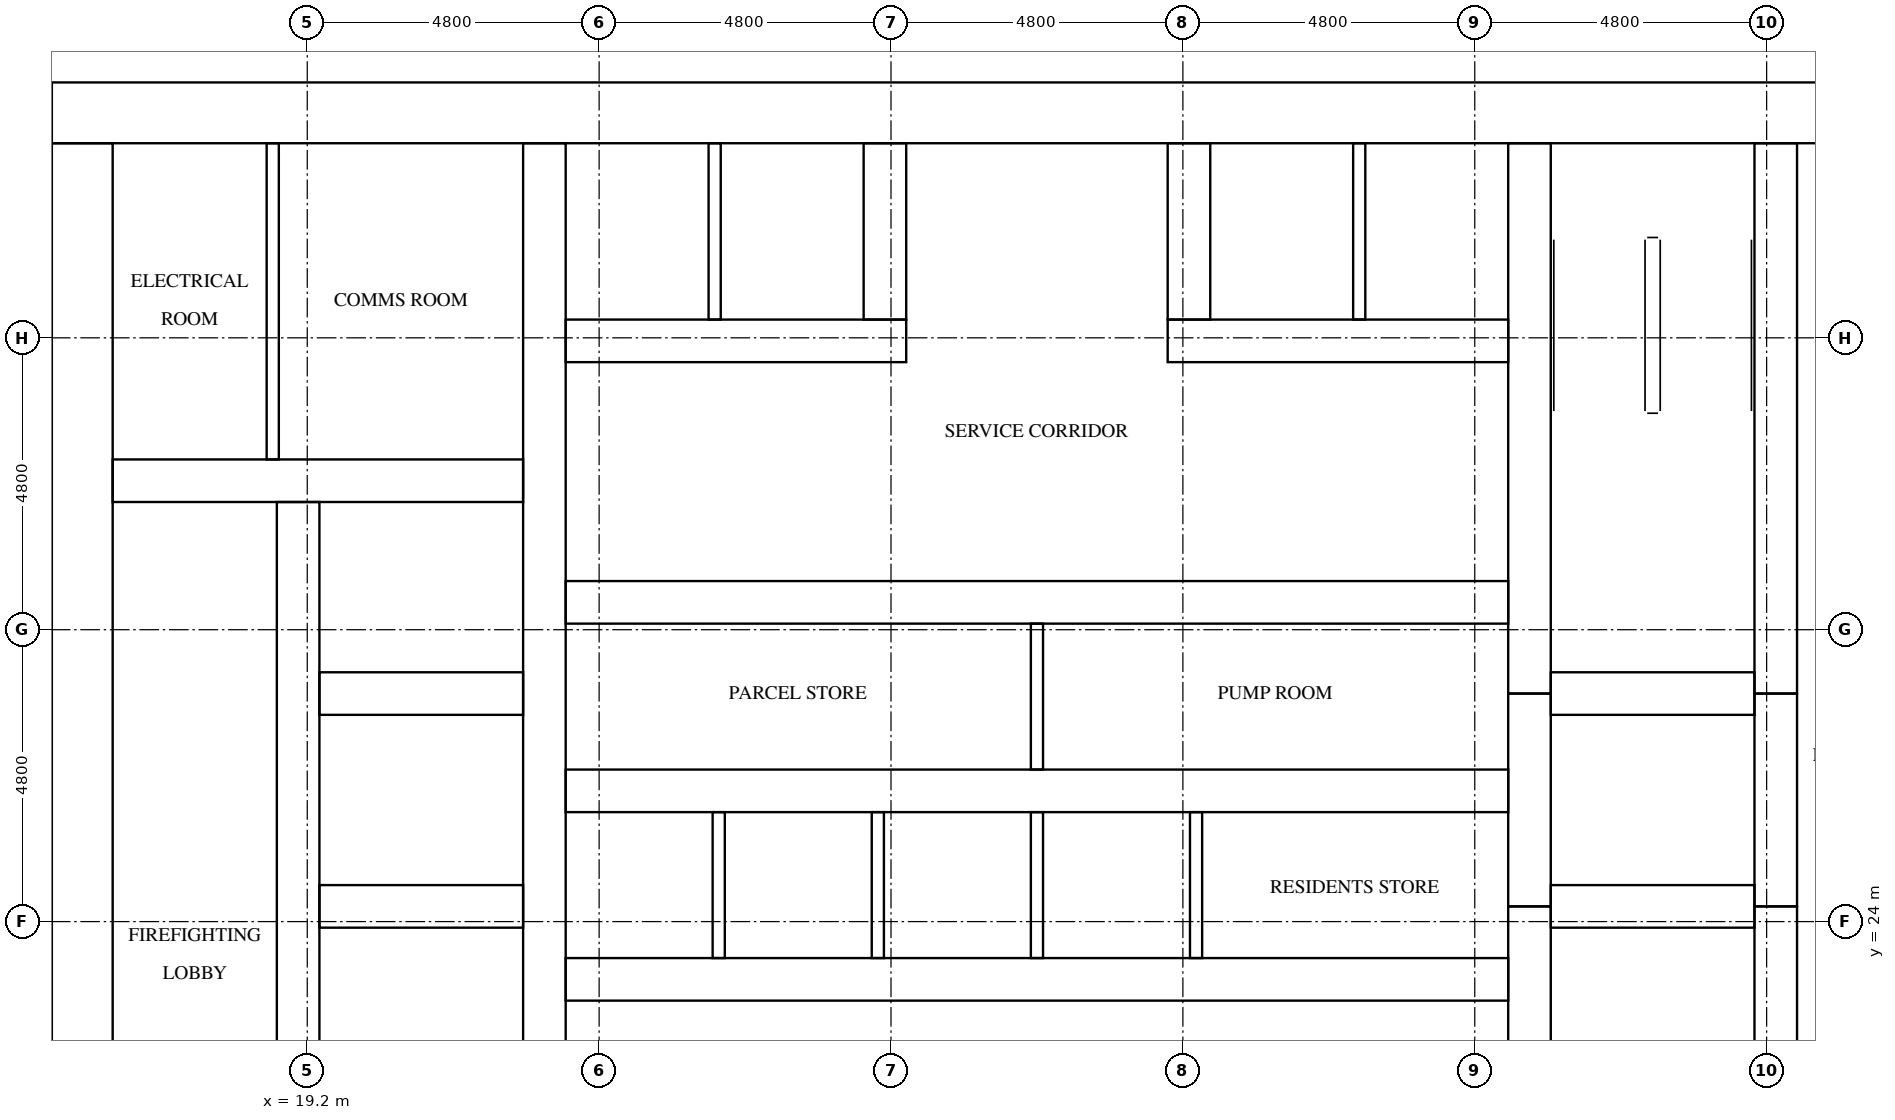
"""IFC4 building model, lengths in metres.
Left out: names, types, materials, properties, quantities, classifications, styles, units other than length and angle.
Written with IfcOpenShell. Run it as: python <this file> out.ifc"""

import sys

from ifc_helpers import new_model, si_unit, direction, frame, frame_2d, origin, place, context, subcontext, project, spatial, rectangle, extrude, element, fill, save


model = new_model("IFC4")
c1 = context("Model", 3, precision=1e-05, world=origin(), true_north=direction((0.0, 1.0)))
c2 = subcontext(c1, "Body", "Model", "MODEL_VIEW")
j1 = project(units=[si_unit("LENGTHUNIT", "METRE"), si_unit("PLANEANGLEUNIT", "RADIAN")], contexts=[c1])
p1 = place(None, origin())
s1 = spatial("IfcSite", under=j1, at=p1, CompositionType="ELEMENT")
p2 = place(p1, origin())
s2 = spatial("IfcBuilding", under=s1, at=p2, CompositionType="ELEMENT")
p3 = place(p2, frame((0.0, 0.0, 39.9)))
s3 = spatial("IfcBuildingStorey", under=s2, at=p3, CompositionType="ELEMENT", Elevation=39.9)
p4 = place(p3, frame((15.0, 37.3, 0.0), z_axis=(0.0, 0.0, 1.0), x_axis=(1.0, 0.0, 0.0)))
e1 = element("IfcWall", 1, at=p4, inside=s3, PredefinedType="SHEAR", context=c2, shape_type="SweptSolid", body=[
    extrude(rectangle(XDim=32.4, YDim=1.0, at=frame_2d((16.2, 0.0))), origin(), (0.0, 0.0, 1.0), 3.2),
])
p5 = place(p4, frame((15.3, 0.0, 0.0)))
e2 = element("IfcOpeningElement", 2, at=p5, cuts=e1, PredefinedType="OPENING", context=c2, shape_type="SweptSolid", body=[
    extrude(rectangle(XDim=1.8, YDim=2.1, at=frame_2d((0.9, 1.05))), frame((0.0, 0.51, 0.0), z_axis=(0.0, -1.0, 0.0), x_axis=(1.0, 0.0, 0.0)), (0.0, 0.0, 1.0), 1.02),
])
p6 = place(p4, frame((1.766, 0.0, 0.0)))
e3 = element("IfcOpeningElement", 3, at=p6, cuts=e1, PredefinedType="OPENING", context=c2, shape_type="SweptSolid", body=[
    extrude(rectangle(XDim=1.0, YDim=2.1, at=frame_2d((0.5, 1.05))), frame((0.0, 0.51, 0.0), z_axis=(0.0, -1.0, 0.0), x_axis=(1.0, 0.0, 0.0)), (0.0, 0.0, 1.0), 1.02),
])
p7 = place(p4, frame((5.241, 0.0, 0.0)))
e4 = element("IfcOpeningElement", 4, at=p7, cuts=e1, PredefinedType="OPENING", context=c2, shape_type="SweptSolid", body=[
    extrude(rectangle(XDim=1.0, YDim=2.1, at=frame_2d((0.5, 1.05))), frame((0.0, 0.51, 0.0), z_axis=(0.0, -1.0, 0.0), x_axis=(1.0, 0.0, 0.0)), (0.0, 0.0, 1.0), 1.02),
])
p8 = place(p3, frame((15.5, 16.0, 0.0), z_axis=(0.0, 0.0, 1.0), x_axis=(0.0, 1.0, 0.0)))
e5 = element("IfcWall", 5, at=p8, inside=s3, PredefinedType="SHEAR", context=c2, shape_type="SweptSolid", body=[
    extrude(rectangle(XDim=20.8, YDim=1.0, at=frame_2d((10.4, 0.0))), origin(), (0.0, 0.0, 1.0), 3.2),
])
p9 = place(p8, frame((4.76, 0.0, 0.0)))
e6 = element("IfcOpeningElement", 6, at=p9, cuts=e5, PredefinedType="OPENING", context=c2, shape_type="SweptSolid", body=[
    extrude(rectangle(XDim=1.2, YDim=2.1, at=frame_2d((0.6, 1.05))), frame((0.0, 0.51, 0.0), z_axis=(0.0, -1.0, 0.0), x_axis=(1.0, 0.0, 0.0)), (0.0, 0.0, 1.0), 1.02),
])
p10 = place(p3, frame((19.05, 16.0, 0.0), z_axis=(0.0, 0.0, 1.0), x_axis=(0.0, 1.0, 0.0)))
e7 = element("IfcWall", 7, at=p10, inside=s3, PredefinedType="SHEAR", context=c2, shape_type="SweptSolid", body=[
    extrude(rectangle(XDim=14.9, YDim=0.7, at=frame_2d((7.45, 0.0))), origin(), (0.0, 0.0, 1.0), 3.2),
])
p11 = place(p10, frame((9.45, 0.0, 0.0)))
e8 = element("IfcOpeningElement", 8, at=p11, cuts=e7, PredefinedType="OPENING", context=c2, shape_type="SweptSolid", body=[
    extrude(rectangle(XDim=1.1, YDim=2.1, at=frame_2d((0.55, 1.05))), frame((0.0, 0.36, 0.0), z_axis=(0.0, -1.0, 0.0), x_axis=(1.0, 0.0, 0.0)), (0.0, 0.0, 1.0), 0.72),
])
p12 = place(p10, frame((12.95, 0.0, 0.0)))
e9 = element("IfcOpeningElement", 9, at=p12, cuts=e7, PredefinedType="OPENING", context=c2, shape_type="SweptSolid", body=[
    extrude(rectangle(XDim=1.1, YDim=2.1, at=frame_2d((0.55, 1.05))), frame((0.0, 0.36, 0.0), z_axis=(0.0, -1.0, 0.0), x_axis=(1.0, 0.0, 0.0)), (0.0, 0.0, 1.0), 0.72),
])
p13 = place(p10, frame((0.2, 0.0, 0.0)))
e10 = element("IfcOpeningElement", 10, at=p13, cuts=e7, PredefinedType="OPENING", context=c2, shape_type="SweptSolid", body=[
    extrude(rectangle(XDim=1.2, YDim=2.1, at=frame_2d((0.6, 1.05))), frame((0.0, 0.36, 0.0), z_axis=(0.0, -1.0, 0.0), x_axis=(1.0, 0.0, 0.0)), (0.0, 0.0, 1.0), 0.72),
])
p14 = place(p3, frame((23.1, 16.0, 0.0), z_axis=(0.0, 0.0, 1.0), x_axis=(0.0, 1.0, 0.0)))
e11 = element("IfcWall", 11, at=p14, inside=s3, PredefinedType="SHEAR", context=c2, shape_type="SweptSolid", body=[
    extrude(rectangle(XDim=20.8, YDim=0.7, at=frame_2d((10.4, 0.0))), origin(), (0.0, 0.0, 1.0), 3.2),
])
p15 = place(p3, frame((39.3, 16.0, 0.0), z_axis=(0.0, 0.0, 1.0), x_axis=(0.0, 1.0, 0.0)))
e12 = element("IfcWall", 12, at=p15, inside=s3, PredefinedType="SHEAR", context=c2, shape_type="SweptSolid", body=[
    extrude(rectangle(XDim=8.25, YDim=0.7, at=frame_2d((4.125, 0.0))), origin(), (0.0, 0.0, 1.0), 3.2),
])
p16 = place(p3, frame((39.3, 24.25, 0.0), z_axis=(0.0, 0.0, 1.0), x_axis=(0.0, 1.0, 0.0)))
e13 = element("IfcWall", 13, at=p16, inside=s3, PredefinedType="SHEAR", context=c2, shape_type="SweptSolid", body=[
    extrude(rectangle(XDim=3.5, YDim=0.7, at=frame_2d((1.75, 0.0))), origin(), (0.0, 0.0, 1.0), 3.2),
])
p17 = place(p3, frame((39.3, 27.75, 0.0), z_axis=(0.0, 0.0, 1.0), x_axis=(0.0, 1.0, 0.0)))
e14 = element("IfcWall", 14, at=p17, inside=s3, PredefinedType="SHEAR", context=c2, shape_type="SweptSolid", body=[
    extrude(rectangle(XDim=9.05, YDim=0.7, at=frame_2d((4.525, 0.0))), origin(), (0.0, 0.0, 1.0), 3.2),
])
p18 = place(p3, frame((43.35, 16.0, 0.0), z_axis=(0.0, 0.0, 1.0), x_axis=(0.0, 1.0, 0.0)))
e15 = element("IfcWall", 15, at=p18, inside=s3, PredefinedType="SHEAR", context=c2, shape_type="SweptSolid", body=[
    extrude(rectangle(XDim=8.25, YDim=0.7, at=frame_2d((4.125, 0.0))), origin(), (0.0, 0.0, 1.0), 3.2),
])
p19 = place(p18, frame((0.2, 0.0, 0.0)))
e16 = element("IfcOpeningElement", 16, at=p19, cuts=e15, PredefinedType="OPENING", context=c2, shape_type="SweptSolid", body=[
    extrude(rectangle(XDim=1.2, YDim=2.1, at=frame_2d((0.6, 1.05))), frame((0.0, 0.36, 0.0), z_axis=(0.0, -1.0, 0.0), x_axis=(1.0, 0.0, 0.0)), (0.0, 0.0, 1.0), 0.72),
])
p20 = place(p3, frame((43.35, 24.25, 0.0), z_axis=(0.0, 0.0, 1.0), x_axis=(0.0, 1.0, 0.0)))
e17 = element("IfcWall", 17, at=p20, inside=s3, PredefinedType="SHEAR", context=c2, shape_type="SweptSolid", body=[
    extrude(rectangle(XDim=3.5, YDim=0.7, at=frame_2d((1.75, 0.0))), origin(), (0.0, 0.0, 1.0), 3.2),
])
p21 = place(p20, frame((1.2, 0.0, 0.0)))
e18 = element("IfcOpeningElement", 18, at=p21, cuts=e17, PredefinedType="OPENING", context=c2, shape_type="SweptSolid", body=[
    extrude(rectangle(XDim=1.1, YDim=2.1, at=frame_2d((0.55, 1.05))), frame((0.0, 0.36, 0.0), z_axis=(0.0, -1.0, 0.0), x_axis=(1.0, 0.0, 0.0)), (0.0, 0.0, 1.0), 0.72),
])
p22 = place(p3, frame((43.35, 27.75, 0.0), z_axis=(0.0, 0.0, 1.0), x_axis=(0.0, 1.0, 0.0)))
e19 = element("IfcWall", 19, at=p22, inside=s3, PredefinedType="SHEAR", context=c2, shape_type="SweptSolid", body=[
    extrude(rectangle(XDim=9.05, YDim=0.7, at=frame_2d((4.525, 0.0))), origin(), (0.0, 0.0, 1.0), 3.2),
])
p23 = place(p22, frame((7.65, 0.0, 0.0)))
e20 = element("IfcOpeningElement", 20, at=p23, cuts=e19, PredefinedType="OPENING", context=c2, shape_type="SweptSolid", body=[
    extrude(rectangle(XDim=1.2, YDim=2.1, at=frame_2d((0.6, 1.05))), frame((0.0, 0.36, 0.0), z_axis=(0.0, -1.0, 0.0), x_axis=(1.0, 0.0, 0.0)), (0.0, 0.0, 1.0), 0.72),
])
for number, where, z_axis, x_axis in (
    (21, (19.4, 24.25, 0.0), (0.0, 0.0, 1.0), (1.0, 0.0, 0.0)),
    (22, (19.4, 27.75, 0.0), (0.0, 0.0, 1.0), (1.0, 0.0, 0.0)),
):
    element("IfcWall", number, at=place(p3, frame(where, z_axis=z_axis, x_axis=x_axis)), inside=s3, PredefinedType="SHEAR", context=c2, shape_type="SweptSolid", body=[
        extrude(rectangle(XDim=3.35, YDim=0.7, at=frame_2d((1.675, 0.0))), origin(), (0.0, 0.0, 1.0), 3.2),
    ])
p24 = place(p3, frame((16.0, 31.25, 0.0), z_axis=(0.0, 0.0, 1.0), x_axis=(1.0, 0.0, 0.0)))
e23 = element("IfcWall", 23, at=p24, inside=s3, PredefinedType="SHEAR", context=c2, shape_type="SweptSolid", body=[
    extrude(rectangle(XDim=6.75, YDim=0.7, at=frame_2d((3.375, 0.0))), origin(), (0.0, 0.0, 1.0), 3.2),
])
for number, where, z_axis, x_axis in (
    (24, (39.65, 24.25, 0.0), (0.0, 0.0, 1.0), (1.0, 0.0, 0.0)),
    (25, (39.65, 27.75, 0.0), (0.0, 0.0, 1.0), (1.0, 0.0, 0.0)),
):
    element("IfcWall", number, at=place(p3, frame(where, z_axis=z_axis, x_axis=x_axis)), inside=s3, PredefinedType="SHEAR", context=c2, shape_type="SweptSolid", body=[
        extrude(rectangle(XDim=3.35, YDim=0.7, at=frame_2d((1.675, 0.0))), origin(), (0.0, 0.0, 1.0), 3.2),
    ])
p25 = place(p3, frame((23.45, 23.05, 0.0), z_axis=(0.0, 0.0, 1.0), x_axis=(1.0, 0.0, 0.0)))
e26 = element("IfcWall", 26, at=p25, inside=s3, PredefinedType="SHEAR", context=c2, shape_type="SweptSolid", body=[
    extrude(rectangle(XDim=15.5, YDim=0.7, at=frame_2d((7.75, 0.0))), origin(), (0.0, 0.0, 1.0), 3.2),
])
p26 = place(p25, frame((0.658, 0.0, 0.0)))
e27 = element("IfcOpeningElement", 27, at=p26, cuts=e26, PredefinedType="OPENING", context=c2, shape_type="SweptSolid", body=[
    extrude(rectangle(XDim=1.1, YDim=2.1, at=frame_2d((0.55, 1.05))), frame((0.0, 0.36, 0.0), z_axis=(0.0, -1.0, 0.0), x_axis=(1.0, 0.0, 0.0)), (0.0, 0.0, 1.0), 0.72),
])
p27 = place(p25, frame((3.275, 0.0, 0.0)))
e28 = element("IfcOpeningElement", 28, at=p27, cuts=e26, PredefinedType="OPENING", context=c2, shape_type="SweptSolid", body=[
    extrude(rectangle(XDim=1.1, YDim=2.1, at=frame_2d((0.55, 1.05))), frame((0.0, 0.36, 0.0), z_axis=(0.0, -1.0, 0.0), x_axis=(1.0, 0.0, 0.0)), (0.0, 0.0, 1.0), 0.72),
])
p28 = place(p25, frame((12.483, 0.0, 0.0)))
e29 = element("IfcOpeningElement", 29, at=p28, cuts=e26, PredefinedType="OPENING", context=c2, shape_type="SweptSolid", body=[
    extrude(rectangle(XDim=1.0, YDim=2.1, at=frame_2d((0.5, 1.05))), frame((0.0, 0.36, 0.0), z_axis=(0.0, -1.0, 0.0), x_axis=(1.0, 0.0, 0.0)), (0.0, 0.0, 1.0), 0.72),
])
p29 = place(p3, frame((23.45, 26.15, 0.0), z_axis=(0.0, 0.0, 1.0), x_axis=(1.0, 0.0, 0.0)))
e30 = element("IfcWall", 30, at=p29, inside=s3, PredefinedType="SHEAR", context=c2, shape_type="SweptSolid", body=[
    extrude(rectangle(XDim=15.5, YDim=0.7, at=frame_2d((7.75, 0.0))), origin(), (0.0, 0.0, 1.0), 3.2),
])
p30 = place(p3, frame((23.45, 29.25, 0.0), z_axis=(0.0, 0.0, 1.0), x_axis=(1.0, 0.0, 0.0)))
e31 = element("IfcWall", 31, at=p30, inside=s3, PredefinedType="SHEAR", context=c2, shape_type="SweptSolid", body=[
    extrude(rectangle(XDim=15.5, YDim=0.7, at=frame_2d((7.75, 0.0))), origin(), (0.0, 0.0, 1.0), 3.2),
])
p31 = place(p30, frame((3.325, 0.0, 0.0)))
e32 = element("IfcOpeningElement", 32, at=p31, cuts=e31, PredefinedType="OPENING", context=c2, shape_type="SweptSolid", body=[
    extrude(rectangle(XDim=1.0, YDim=2.1, at=frame_2d((0.5, 1.05))), frame((0.0, 0.36, 0.0), z_axis=(0.0, -1.0, 0.0), x_axis=(1.0, 0.0, 0.0)), (0.0, 0.0, 1.0), 0.72),
])
p32 = place(p30, frame((11.175, 0.0, 0.0)))
e33 = element("IfcOpeningElement", 33, at=p32, cuts=e31, PredefinedType="OPENING", context=c2, shape_type="SweptSolid", body=[
    extrude(rectangle(XDim=1.0, YDim=2.1, at=frame_2d((0.5, 1.05))), frame((0.0, 0.36, 0.0), z_axis=(0.0, -1.0, 0.0), x_axis=(1.0, 0.0, 0.0)), (0.0, 0.0, 1.0), 0.72),
])
p33 = place(p3, frame((23.45, 33.55, 0.0), z_axis=(0.0, 0.0, 1.0), x_axis=(1.0, 0.0, 0.0)))
e34 = element("IfcWall", 34, at=p33, inside=s3, PredefinedType="SHEAR", context=c2, shape_type="SweptSolid", body=[
    extrude(rectangle(XDim=5.6, YDim=0.7, at=frame_2d((2.8, 0.0))), origin(), (0.0, 0.0, 1.0), 3.2),
])
p34 = place(p3, frame((33.35, 33.55, 0.0), z_axis=(0.0, 0.0, 1.0), x_axis=(1.0, 0.0, 0.0)))
e35 = element("IfcWall", 35, at=p34, inside=s3, PredefinedType="SHEAR", context=c2, shape_type="SweptSolid", body=[
    extrude(rectangle(XDim=5.6, YDim=0.7, at=frame_2d((2.8, 0.0))), origin(), (0.0, 0.0, 1.0), 3.2),
])
for number, where, z_axis, x_axis in (
    (36, (28.7, 33.9, 0.0), (0.0, 0.0, 1.0), (0.0, 1.0, 0.0)),
    (37, (33.7, 33.9, 0.0), (0.0, 0.0, 1.0), (0.0, 1.0, 0.0)),
):
    element("IfcWall", number, at=place(p3, frame(where, z_axis=z_axis, x_axis=x_axis)), inside=s3, PredefinedType="SHEAR", context=c2, shape_type="SweptSolid", body=[
        extrude(rectangle(XDim=2.9, YDim=0.7, at=frame_2d((1.45, 0.0))), origin(), (0.0, 0.0, 1.0), 3.2),
    ])
for number, where, z_axis, x_axis in (
    (38, (25.967, 23.4, 0.0), (0.0, 0.0, 1.0), (0.0, 1.0, 0.0)),
    (39, (28.583, 23.4, 0.0), (0.0, 0.0, 1.0), (0.0, 1.0, 0.0)),
    (40, (31.2, 23.4, 0.0), (0.0, 0.0, 1.0), (0.0, 1.0, 0.0)),
    (41, (33.817, 23.4, 0.0), (0.0, 0.0, 1.0), (0.0, 1.0, 0.0)),
):
    element("IfcWall", number, at=place(p3, frame(where, z_axis=z_axis, x_axis=x_axis)), inside=s3, PredefinedType="SOLIDWALL", context=c2, shape_type="SweptSolid", body=[
        extrude(rectangle(XDim=2.4, YDim=0.2, at=frame_2d((1.2, 0.0))), origin(), (0.0, 0.0, 1.0), 3.2),
    ])
for number, where, z_axis, x_axis in (
    (42, (25.9, 33.9, 0.0), (0.0, 0.0, 1.0), (0.0, 1.0, 0.0)),
    (43, (36.5, 33.9, 0.0), (0.0, 0.0, 1.0), (0.0, 1.0, 0.0)),
):
    element("IfcWall", number, at=place(p3, frame(where, z_axis=z_axis, x_axis=x_axis)), inside=s3, PredefinedType="SOLIDWALL", context=c2, shape_type="SweptSolid", body=[
        extrude(rectangle(XDim=2.9, YDim=0.2, at=frame_2d((1.45, 0.0))), origin(), (0.0, 0.0, 1.0), 3.2),
    ])
p35 = place(p3, frame((18.633, 31.6, 0.0), z_axis=(0.0, 0.0, 1.0), x_axis=(0.0, 1.0, 0.0)))
e44 = element("IfcWall", 44, at=p35, inside=s3, PredefinedType="PARTITIONING", context=c2, shape_type="SweptSolid", body=[
    extrude(rectangle(XDim=5.2, YDim=0.2, at=frame_2d((2.6, 0.0))), origin(), (0.0, 0.0, 1.0), 3.2),
])
p36 = place(p3, frame((31.2, 26.5, 0.0), z_axis=(0.0, 0.0, 1.0), x_axis=(0.0, 1.0, 0.0)))
e45 = element("IfcWall", 45, at=p36, inside=s3, PredefinedType="PARTITIONING", context=c2, shape_type="SweptSolid", body=[
    extrude(rectangle(XDim=2.4, YDim=0.2, at=frame_2d((1.2, 0.0))), origin(), (0.0, 0.0, 1.0), 3.2),
])
p37 = place(p26, origin())
e46 = element("IfcDoor", 46, at=p37, inside=s3, OperationType="DOUBLE_DOOR_SLIDING", PredefinedType="DOOR", context=c2, shape_type="SweptSolid", body=[
    extrude(rectangle(XDim=1.1, YDim=2.1, at=frame_2d((0.55, 1.05))), frame((0.0, 0.025, 0.0), z_axis=(0.0, -1.0, 0.0), x_axis=(1.0, 0.0, 0.0)), (0.0, 0.0, 1.0), 0.05),
])
fill(e27, e46)
p38 = place(p27, origin())
e47 = element("IfcDoor", 47, at=p38, inside=s3, OperationType="DOUBLE_DOOR_SLIDING", PredefinedType="DOOR", context=c2, shape_type="SweptSolid", body=[
    extrude(rectangle(XDim=1.1, YDim=2.1, at=frame_2d((0.55, 1.05))), frame((0.0, 0.025, 0.0), z_axis=(0.0, -1.0, 0.0), x_axis=(1.0, 0.0, 0.0)), (0.0, 0.0, 1.0), 0.05),
])
fill(e28, e47)
p39 = place(p11, origin())
e48 = element("IfcDoor", 48, at=p39, inside=s3, OperationType="DOUBLE_DOOR_SLIDING", PredefinedType="DOOR", context=c2, shape_type="SweptSolid", body=[
    extrude(rectangle(XDim=1.1, YDim=2.1, at=frame_2d((0.55, 1.05))), frame((0.0, 0.025, 0.0), z_axis=(0.0, -1.0, 0.0), x_axis=(1.0, 0.0, 0.0)), (0.0, 0.0, 1.0), 0.05),
])
fill(e8, e48)
p40 = place(p12, origin())
e49 = element("IfcDoor", 49, at=p40, inside=s3, OperationType="DOUBLE_DOOR_SLIDING", PredefinedType="DOOR", context=c2, shape_type="SweptSolid", body=[
    extrude(rectangle(XDim=1.1, YDim=2.1, at=frame_2d((0.55, 1.05))), frame((0.0, 0.025, 0.0), z_axis=(0.0, -1.0, 0.0), x_axis=(1.0, 0.0, 0.0)), (0.0, 0.0, 1.0), 0.05),
])
fill(e9, e49)
p41 = place(p21, origin())
e50 = element("IfcDoor", 50, at=p41, inside=s3, OperationType="DOUBLE_DOOR_SLIDING", PredefinedType="DOOR", context=c2, shape_type="SweptSolid", body=[
    extrude(rectangle(XDim=1.1, YDim=2.1, at=frame_2d((0.55, 1.05))), frame((0.0, 0.025, 0.0), z_axis=(0.0, -1.0, 0.0), x_axis=(1.0, 0.0, 0.0)), (0.0, 0.0, 1.0), 0.05),
])
fill(e18, e50)
p42 = place(p23, origin())
e51 = element("IfcDoor", 51, at=p42, inside=s3, OperationType="SINGLE_SWING_LEFT", PredefinedType="DOOR", context=c2, shape_type="SweptSolid", body=[
    extrude(rectangle(XDim=1.2, YDim=2.1, at=frame_2d((0.6, 1.05))), frame((0.0, 0.025, 0.0), z_axis=(0.0, -1.0, 0.0), x_axis=(1.0, 0.0, 0.0)), (0.0, 0.0, 1.0), 0.05),
])
fill(e20, e51)
p43 = place(p5, origin())
e52 = element("IfcDoor", 52, at=p43, inside=s3, OperationType="DOUBLE_DOOR_SINGLE_SWING", PredefinedType="DOOR", context=c2, shape_type="SweptSolid", body=[
    extrude(rectangle(XDim=1.8, YDim=2.1, at=frame_2d((0.9, 1.05))), frame((0.0, 0.025, 0.0), z_axis=(0.0, -1.0, 0.0), x_axis=(1.0, 0.0, 0.0)), (0.0, 0.0, 1.0), 0.05),
])
fill(e2, e52)
p44 = place(p6, origin())
e53 = element("IfcDoor", 53, at=p44, inside=s3, OperationType="SINGLE_SWING_RIGHT", PredefinedType="DOOR", context=c2, shape_type="SweptSolid", body=[
    extrude(rectangle(XDim=1.0, YDim=2.1, at=frame_2d((0.5, 1.05))), frame((0.0, 0.025, 0.0), z_axis=(0.0, -1.0, 0.0), x_axis=(1.0, 0.0, 0.0)), (0.0, 0.0, 1.0), 0.05),
])
fill(e3, e53)
p45 = place(p7, origin())
e54 = element("IfcDoor", 54, at=p45, inside=s3, OperationType="SINGLE_SWING_LEFT", PredefinedType="DOOR", context=c2, shape_type="SweptSolid", body=[
    extrude(rectangle(XDim=1.0, YDim=2.1, at=frame_2d((0.5, 1.05))), frame((0.0, 0.025, 0.0), z_axis=(0.0, -1.0, 0.0), x_axis=(1.0, 0.0, 0.0)), (0.0, 0.0, 1.0), 0.05),
])
fill(e4, e54)
p46 = place(p28, frame((1.0, 0.0, 0.0), z_axis=(0.0, 0.0, 1.0), x_axis=(-1.0, 0.0, 0.0)))
e55 = element("IfcDoor", 55, at=p46, inside=s3, OperationType="SINGLE_SWING_RIGHT", PredefinedType="DOOR", context=c2, shape_type="SweptSolid", body=[
    extrude(rectangle(XDim=1.0, YDim=2.1, at=frame_2d((0.5, 1.05))), frame((0.0, 0.025, 0.0), z_axis=(0.0, -1.0, 0.0), x_axis=(1.0, 0.0, 0.0)), (0.0, 0.0, 1.0), 0.05),
])
fill(e29, e55)
p47 = place(p31, origin())
e56 = element("IfcDoor", 56, at=p47, inside=s3, OperationType="SINGLE_SWING_LEFT", PredefinedType="DOOR", context=c2, shape_type="SweptSolid", body=[
    extrude(rectangle(XDim=1.0, YDim=2.1, at=frame_2d((0.5, 1.05))), frame((0.0, 0.025, 0.0), z_axis=(0.0, -1.0, 0.0), x_axis=(1.0, 0.0, 0.0)), (0.0, 0.0, 1.0), 0.05),
])
fill(e32, e56)
p48 = place(p32, origin())
e57 = element("IfcDoor", 57, at=p48, inside=s3, OperationType="SINGLE_SWING_RIGHT", PredefinedType="DOOR", context=c2, shape_type="SweptSolid", body=[
    extrude(rectangle(XDim=1.0, YDim=2.1, at=frame_2d((0.5, 1.05))), frame((0.0, 0.025, 0.0), z_axis=(0.0, -1.0, 0.0), x_axis=(1.0, 0.0, 0.0)), (0.0, 0.0, 1.0), 0.05),
])
fill(e33, e57)
save(model, sys.argv[1])
